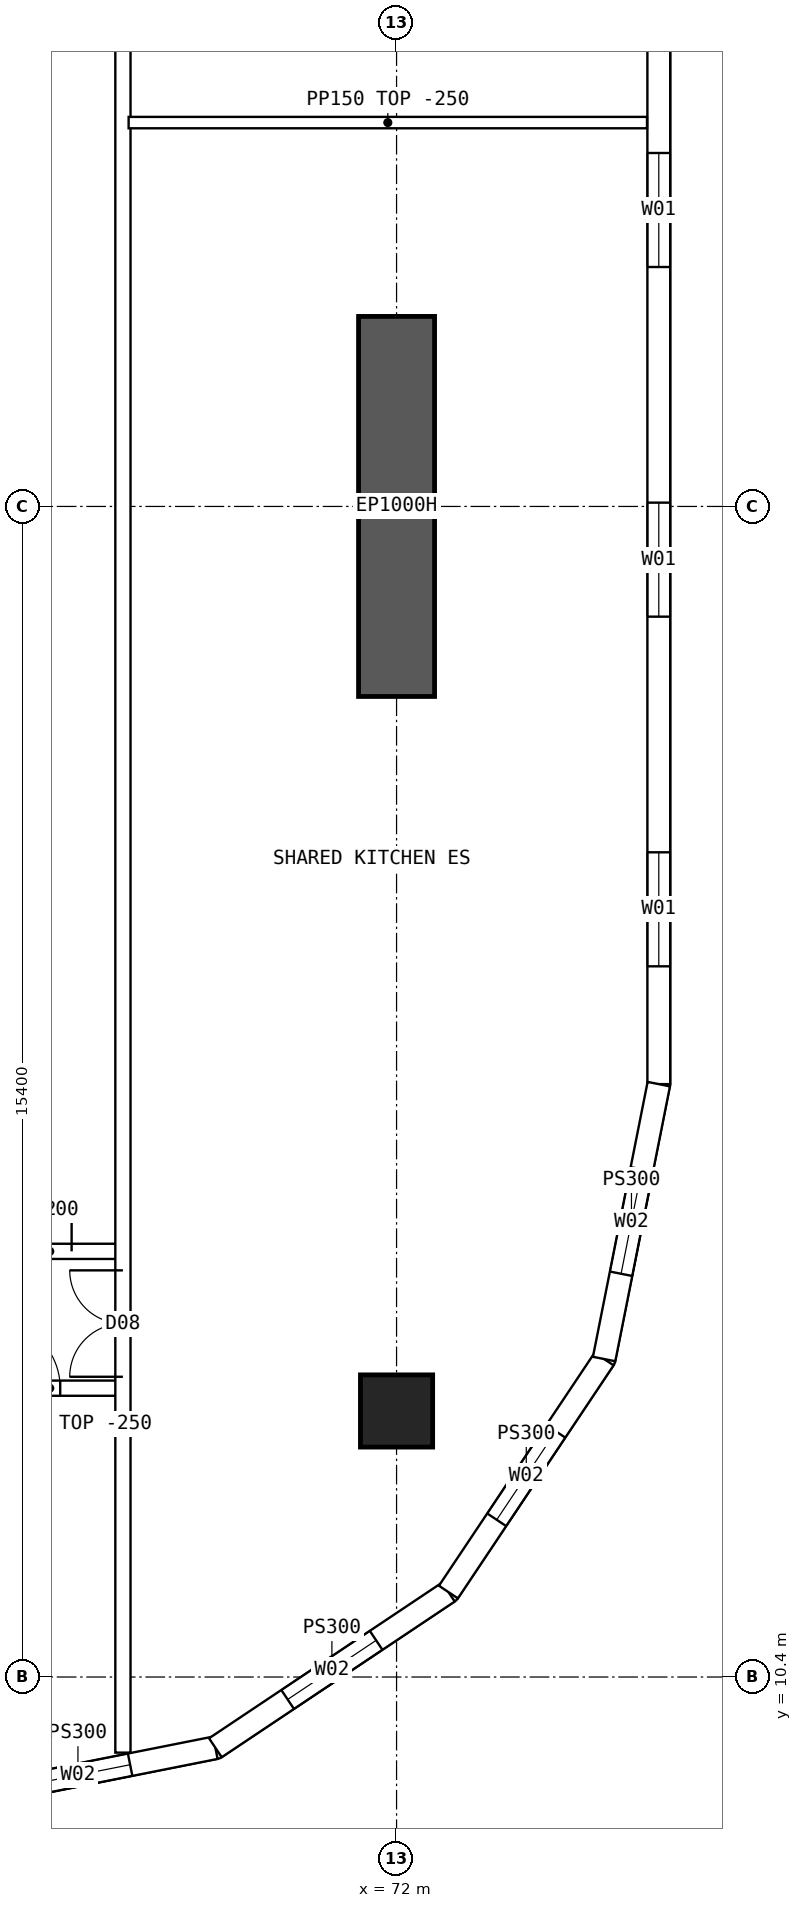
"""IFC4 building model, lengths in metres.
Left out: names, types, materials, properties, quantities, classifications, styles, units other than length and angle.
Written with IfcOpenShell. Run it as: python <this file> out.ifc"""

import sys

from ifc_helpers import new_model, si_unit, direction, frame, frame_2d, origin, origin_2d, place, context, subcontext, project, spatial, polyline, rectangle, hollow_rectangle, outline, extrude, element, fill, save


model = new_model("IFC4")
c1 = context("Model", 3, precision=1e-05, world=origin(), true_north=direction((0.0, 1.0)))
c2 = subcontext(c1, "Body", "Model", "MODEL_VIEW")
j1 = project(units=[si_unit("LENGTHUNIT", "METRE"), si_unit("PLANEANGLEUNIT", "RADIAN")], contexts=[c1])
p1 = place(None, origin())
s1 = spatial("IfcSite", under=j1, at=p1, CompositionType="ELEMENT")
p2 = place(p1, origin())
s2 = spatial("IfcBuilding", under=s1, at=p2, CompositionType="ELEMENT")
p3 = place(p2, frame((0.0, 0.0, 125.65)))
s3 = spatial("IfcBuildingStorey", under=s2, at=p3, CompositionType="ELEMENT", Elevation=125.65)
p4 = place(p3, frame((72.0, 13.9, 0.0), z_axis=(0.0, 0.0, 1.0), x_axis=(1.0, 0.0, 0.0)))
e1 = element("IfcColumn", 1, at=p4, inside=s3, PredefinedType="COLUMN", context=c2, shape_type="SweptSolid", body=[
    extrude(hollow_rectangle(XDim=0.95, YDim=0.95, WallThickness=0.095, at=origin_2d()), origin(), (0.0, 0.0, 1.0), 3.75),
])
p5 = place(p3, frame((72.0, 23.3, 0.0), z_axis=(0.0, 0.0, 1.0), x_axis=(0.0, 1.0, 0.0)))
e2 = element("IfcWall", 2, at=p5, inside=s3, PredefinedType="SHEAR", context=c2, shape_type="SweptSolid", body=[
    extrude(rectangle(XDim=5.0, YDim=1.0, at=frame_2d((2.5, 0.0))), origin(), (0.0, 0.0, 1.0), 3.75),
])
p6 = place(p3, frame((75.45, 18.2, 0.0), z_axis=(0.0, 0.0, 1.0), x_axis=(0.0, 1.0, 0.0)))
e3 = element("IfcWall", 3, at=p6, inside=s3, PredefinedType="SOLIDWALL", context=c2, shape_type="SweptSolid", body=[
    extrude(outline(polyline([(-0.015, -0.15), (27.615, -0.15), (27.585, 0.15), (0.015, 0.15), (-0.015, -0.15)])), origin(), (0.0, 0.0, 1.0), 3.5),
])
p7 = place(p6, frame((1.55, 0.0, 0.9)))
e4 = element("IfcOpeningElement", 4, at=p7, cuts=e3, PredefinedType="OPENING", context=c2, shape_type="SweptSolid", body=[
    extrude(rectangle(XDim=1.5, YDim=2.0, at=frame_2d((0.75, 1.0))), frame((0.0, 0.16, 0.0), z_axis=(0.0, -1.0, 0.0), x_axis=(1.0, 0.0, 0.0)), (0.0, 0.0, 1.0), 0.32),
])
p8 = place(p6, frame((6.15, 0.0, 0.9)))
e5 = element("IfcOpeningElement", 5, at=p8, cuts=e3, PredefinedType="OPENING", context=c2, shape_type="SweptSolid", body=[
    extrude(rectangle(XDim=1.5, YDim=2.0, at=frame_2d((0.75, 1.0))), frame((0.0, 0.16, 0.0), z_axis=(0.0, -1.0, 0.0), x_axis=(1.0, 0.0, 0.0)), (0.0, 0.0, 1.0), 0.32),
])
p9 = place(p6, frame((10.75, 0.0, 0.9)))
e6 = element("IfcOpeningElement", 6, at=p9, cuts=e3, PredefinedType="OPENING", context=c2, shape_type="SweptSolid", body=[
    extrude(rectangle(XDim=1.5, YDim=2.0, at=frame_2d((0.75, 1.0))), frame((0.0, 0.16, 0.0), z_axis=(0.0, -1.0, 0.0), x_axis=(1.0, 0.0, 0.0)), (0.0, 0.0, 1.0), 0.32),
])
p10 = place(p6, frame((15.35, 0.0, 0.9)))
e7 = element("IfcOpeningElement", 7, at=p10, cuts=e3, PredefinedType="OPENING", context=c2, shape_type="SweptSolid", body=[
    extrude(rectangle(XDim=1.5, YDim=2.0, at=frame_2d((0.75, 1.0))), frame((0.0, 0.16, 0.0), z_axis=(0.0, -1.0, 0.0), x_axis=(1.0, 0.0, 0.0)), (0.0, 0.0, 1.0), 0.32),
])
p11 = place(p6, frame((19.95, 0.0, 0.9)))
e8 = element("IfcOpeningElement", 8, at=p11, cuts=e3, PredefinedType="OPENING", context=c2, shape_type="SweptSolid", body=[
    extrude(rectangle(XDim=1.5, YDim=2.0, at=frame_2d((0.75, 1.0))), frame((0.0, 0.16, 0.0), z_axis=(0.0, -1.0, 0.0), x_axis=(1.0, 0.0, 0.0)), (0.0, 0.0, 1.0), 0.32),
])
p12 = place(p6, frame((24.55, 0.0, 0.9)))
e9 = element("IfcOpeningElement", 9, at=p12, cuts=e3, PredefinedType="OPENING", context=c2, shape_type="SweptSolid", body=[
    extrude(rectangle(XDim=1.5, YDim=2.0, at=frame_2d((0.75, 1.0))), frame((0.0, 0.16, 0.0), z_axis=(0.0, -1.0, 0.0), x_axis=(1.0, 0.0, 0.0)), (0.0, 0.0, 1.0), 0.32),
])
p13 = place(p3, frame((66.0, 8.75, 0.0), z_axis=(0.0, 0.0, 1.0), x_axis=(0.980791473772, 0.195059183267, 0.0)))
e10 = element("IfcWall", 10, at=p13, inside=s3, PredefinedType="SOLIDWALL", context=c2, shape_type="SweptSolid", body=[
    extrude(outline(polyline([(-0.03, -0.15), (3.717, -0.15), (3.657, 0.15), (0.03, 0.15), (-0.03, -0.15)])), origin(), (0.0, 0.0, 1.0), 3.5),
])
p14 = place(p13, frame((1.144, 0.0, 0.9)))
e11 = element("IfcOpeningElement", 11, at=p14, cuts=e10, PredefinedType="OPENING", context=c2, shape_type="SweptSolid", body=[
    extrude(rectangle(XDim=1.4, YDim=1.8, at=frame_2d((0.7, 0.9))), frame((0.0, 0.16, 0.0), z_axis=(0.0, -1.0, 0.0), x_axis=(1.0, 0.0, 0.0)), (0.0, 0.0, 1.0), 0.32),
])
p15 = place(p3, frame((69.616, 9.469, 0.0), z_axis=(0.0, 0.0, 1.0), x_axis=(0.831448786846, 0.555601399253, 0.0)))
e12 = element("IfcWall", 12, at=p15, inside=s3, PredefinedType="SOLIDWALL", context=c2, shape_type="SweptSolid", body=[
    extrude(outline(polyline([(-0.03, -0.15), (3.717, -0.15), (3.657, 0.15), (0.03, 0.15), (-0.03, -0.15)])), origin(), (0.0, 0.0, 1.0), 3.5),
])
p16 = place(p15, frame((1.144, 0.0, 0.9)))
e13 = element("IfcOpeningElement", 13, at=p16, cuts=e12, PredefinedType="OPENING", context=c2, shape_type="SweptSolid", body=[
    extrude(rectangle(XDim=1.4, YDim=1.8, at=frame_2d((0.7, 0.9))), frame((0.0, 0.16, 0.0), z_axis=(0.0, -1.0, 0.0), x_axis=(1.0, 0.0, 0.0)), (0.0, 0.0, 1.0), 0.32),
])
p17 = place(p3, frame((72.682, 11.518, 0.0), z_axis=(0.0, 0.0, 1.0), x_axis=(0.555601399253, 0.831448786846, 0.0)))
e14 = element("IfcWall", 14, at=p17, inside=s3, PredefinedType="SOLIDWALL", context=c2, shape_type="SweptSolid", body=[
    extrude(outline(polyline([(-0.03, -0.15), (3.717, -0.15), (3.657, 0.15), (0.03, 0.15), (-0.03, -0.15)])), origin(), (0.0, 0.0, 1.0), 3.5),
])
p18 = place(p17, frame((1.144, 0.0, 0.9)))
e15 = element("IfcOpeningElement", 15, at=p18, cuts=e14, PredefinedType="OPENING", context=c2, shape_type="SweptSolid", body=[
    extrude(rectangle(XDim=1.4, YDim=1.8, at=frame_2d((0.7, 0.9))), frame((0.0, 0.16, 0.0), z_axis=(0.0, -1.0, 0.0), x_axis=(1.0, 0.0, 0.0)), (0.0, 0.0, 1.0), 0.32),
])
p19 = place(p3, frame((74.731, 14.583, 0.0), z_axis=(0.0, 0.0, 1.0), x_axis=(0.195059183267, 0.980791473772, 0.0)))
e16 = element("IfcWall", 16, at=p19, inside=s3, PredefinedType="SOLIDWALL", context=c2, shape_type="SweptSolid", body=[
    extrude(outline(polyline([(-0.03, -0.15), (3.702, -0.15), (3.672, 0.15), (0.03, 0.15), (-0.03, -0.15)])), origin(), (0.0, 0.0, 1.0), 3.5),
])
p20 = place(p19, frame((1.144, 0.0, 0.9)))
e17 = element("IfcOpeningElement", 17, at=p20, cuts=e16, PredefinedType="OPENING", context=c2, shape_type="SweptSolid", body=[
    extrude(rectangle(XDim=1.4, YDim=1.8, at=frame_2d((0.7, 0.9))), frame((0.0, 0.16, 0.0), z_axis=(0.0, -1.0, 0.0), x_axis=(1.0, 0.0, 0.0)), (0.0, 0.0, 1.0), 0.32),
])
p21 = place(p3, frame((66.475, 14.2, 0.0), z_axis=(0.0, 0.0, 1.0), x_axis=(1.0, 0.0, 0.0)))
e18 = element("IfcWall", 18, at=p21, inside=s3, PredefinedType="SOLIDWALL", context=c2, shape_type="SweptSolid", body=[
    extrude(rectangle(XDim=1.925, YDim=0.2, at=frame_2d((0.962, 0.0))), origin(), (0.0, 0.0, 1.0), 3.5),
])
p22 = place(p21, frame((0.2, 0.0, 0.0)))
e19 = element("IfcOpeningElement", 19, at=p22, cuts=e18, PredefinedType="OPENING", context=c2, shape_type="SweptSolid", body=[
    extrude(rectangle(XDim=0.9, YDim=2.1, at=frame_2d((0.45, 1.05))), frame((0.0, 0.11, 0.0), z_axis=(0.0, -1.0, 0.0), x_axis=(1.0, 0.0, 0.0)), (0.0, 0.0, 1.0), 0.22),
])
p23 = place(p3, frame((66.475, 16.0, 0.0), z_axis=(0.0, 0.0, 1.0), x_axis=(1.0, 0.0, 0.0)))
e20 = element("IfcWall", 20, at=p23, inside=s3, PredefinedType="SOLIDWALL", context=c2, shape_type="SweptSolid", body=[
    extrude(rectangle(XDim=1.925, YDim=0.2, at=frame_2d((0.962, 0.0))), origin(), (0.0, 0.0, 1.0), 3.5),
])
p24 = place(p23, frame((0.05, 0.0, 0.0)))
e21 = element("IfcOpeningElement", 21, at=p24, cuts=e20, PredefinedType="OPENING", context=c2, shape_type="SweptSolid", body=[
    extrude(rectangle(XDim=1.2, YDim=2.1, at=frame_2d((0.6, 1.05))), frame((0.0, 0.11, 0.0), z_axis=(0.0, -1.0, 0.0), x_axis=(1.0, 0.0, 0.0)), (0.0, 0.0, 1.0), 0.22),
])
p25 = place(p3, frame((68.475, 30.85, 0.0), z_axis=(0.0, 0.0, 1.0), x_axis=(1.0, 0.0, 0.0)))
e22 = element("IfcWall", 22, at=p25, inside=s3, PredefinedType="PARTITIONING", context=c2, shape_type="SweptSolid", body=[
    extrude(outline(polyline([(0.0, 0.0), (6.82, 0.0), (6.82, 3.5), (3.827, 3.5), (3.825, 3.05), (3.227, 3.05), (3.225, 3.5), (0.0, 3.5), (0.0, 0.0)])), frame((0.0, 0.075, 0.0), z_axis=(0.0, -1.0, 0.0), x_axis=(1.0, 0.0, 0.0)), (0.0, 0.0, 1.0), 0.15),
])
p26 = place(p3, frame((68.4, 9.405, 0.0), z_axis=(0.0, 0.0, 1.0), x_axis=(0.0, 1.0, 0.0)))
e23 = element("IfcWall", 23, at=p26, inside=s3, PredefinedType="SOLIDWALL", context=c2, shape_type="SweptSolid", body=[
    extrude(rectangle(XDim=45.189, YDim=0.2, at=frame_2d((22.595, 0.0))), origin(), (0.0, 0.0, 1.0), 3.5),
])
p27 = place(p26, frame((4.945, 0.0, 0.0)))
e24 = element("IfcOpeningElement", 24, at=p27, cuts=e23, PredefinedType="OPENING", context=c2, shape_type="SweptSolid", body=[
    extrude(rectangle(XDim=1.4, YDim=2.1, at=frame_2d((0.7, 1.05))), frame((0.0, 0.11, 0.0), z_axis=(0.0, -1.0, 0.0), x_axis=(1.0, 0.0, 0.0)), (0.0, 0.0, 1.0), 0.22),
])
p28 = place(p26, frame((38.745, 0.0, 0.0)))
e25 = element("IfcOpeningElement", 25, at=p28, cuts=e23, PredefinedType="OPENING", context=c2, shape_type="SweptSolid", body=[
    extrude(rectangle(XDim=1.4, YDim=2.1, at=frame_2d((0.7, 1.05))), frame((0.0, 0.11, 0.0), z_axis=(0.0, -1.0, 0.0), x_axis=(1.0, 0.0, 0.0)), (0.0, 0.0, 1.0), 0.22),
])
p29 = place(p7, origin())
e26 = element("IfcWindow", 26, at=p29, inside=s3, PartitioningType="SINGLE_PANEL", PredefinedType="WINDOW", context=c2, shape_type="SweptSolid", body=[
    extrude(rectangle(XDim=1.5, YDim=2.0, at=frame_2d((0.75, 1.0))), frame((0.0, 0.03, 0.0), z_axis=(0.0, -1.0, 0.0), x_axis=(1.0, 0.0, 0.0)), (0.0, 0.0, 1.0), 0.06),
])
fill(e4, e26)
p30 = place(p8, origin())
e27 = element("IfcWindow", 27, at=p30, inside=s3, PartitioningType="SINGLE_PANEL", PredefinedType="WINDOW", context=c2, shape_type="SweptSolid", body=[
    extrude(rectangle(XDim=1.5, YDim=2.0, at=frame_2d((0.75, 1.0))), frame((0.0, 0.03, 0.0), z_axis=(0.0, -1.0, 0.0), x_axis=(1.0, 0.0, 0.0)), (0.0, 0.0, 1.0), 0.06),
])
fill(e5, e27)
p31 = place(p9, origin())
e28 = element("IfcWindow", 28, at=p31, inside=s3, PartitioningType="SINGLE_PANEL", PredefinedType="WINDOW", context=c2, shape_type="SweptSolid", body=[
    extrude(rectangle(XDim=1.5, YDim=2.0, at=frame_2d((0.75, 1.0))), frame((0.0, 0.03, 0.0), z_axis=(0.0, -1.0, 0.0), x_axis=(1.0, 0.0, 0.0)), (0.0, 0.0, 1.0), 0.06),
])
fill(e6, e28)
p32 = place(p14, origin())
e29 = element("IfcWindow", 29, at=p32, inside=s3, PartitioningType="SINGLE_PANEL", PredefinedType="WINDOW", context=c2, shape_type="SweptSolid", body=[
    extrude(rectangle(XDim=1.4, YDim=1.8, at=frame_2d((0.7, 0.9))), frame((0.0, 0.03, 0.0), z_axis=(0.0, -1.0, 0.0), x_axis=(1.0, 0.0, 0.0)), (0.0, 0.0, 1.0), 0.06),
])
fill(e11, e29)
p33 = place(p16, origin())
e30 = element("IfcWindow", 30, at=p33, inside=s3, PartitioningType="SINGLE_PANEL", PredefinedType="WINDOW", context=c2, shape_type="SweptSolid", body=[
    extrude(rectangle(XDim=1.4, YDim=1.8, at=frame_2d((0.7, 0.9))), frame((0.0, 0.03, 0.0), z_axis=(0.0, -1.0, 0.0), x_axis=(1.0, 0.0, 0.0)), (0.0, 0.0, 1.0), 0.06),
])
fill(e13, e30)
p34 = place(p18, origin())
e31 = element("IfcWindow", 31, at=p34, inside=s3, PartitioningType="SINGLE_PANEL", PredefinedType="WINDOW", context=c2, shape_type="SweptSolid", body=[
    extrude(rectangle(XDim=1.4, YDim=1.8, at=frame_2d((0.7, 0.9))), frame((0.0, 0.03, 0.0), z_axis=(0.0, -1.0, 0.0), x_axis=(1.0, 0.0, 0.0)), (0.0, 0.0, 1.0), 0.06),
])
fill(e15, e31)
p35 = place(p20, origin())
e32 = element("IfcWindow", 32, at=p35, inside=s3, PartitioningType="SINGLE_PANEL", PredefinedType="WINDOW", context=c2, shape_type="SweptSolid", body=[
    extrude(rectangle(XDim=1.4, YDim=1.8, at=frame_2d((0.7, 0.9))), frame((0.0, 0.03, 0.0), z_axis=(0.0, -1.0, 0.0), x_axis=(1.0, 0.0, 0.0)), (0.0, 0.0, 1.0), 0.06),
])
fill(e17, e32)
p36 = place(p24, origin())
e33 = element("IfcDoor", 33, at=p36, inside=s3, OperationType="DOUBLE_DOOR_SINGLE_SWING", PredefinedType="DOOR", context=c2, shape_type="SweptSolid", body=[
    extrude(rectangle(XDim=1.2, YDim=2.1, at=frame_2d((0.6, 1.05))), frame((0.0, 0.025, 0.0), z_axis=(0.0, -1.0, 0.0), x_axis=(1.0, 0.0, 0.0)), (0.0, 0.0, 1.0), 0.05),
])
fill(e21, e33)
p37 = place(p27, origin())
e34 = element("IfcDoor", 34, at=p37, inside=s3, OperationType="DOUBLE_DOOR_SINGLE_SWING", PredefinedType="DOOR", context=c2, shape_type="SweptSolid", body=[
    extrude(rectangle(XDim=1.4, YDim=2.1, at=frame_2d((0.7, 1.05))), frame((0.0, 0.025, 0.0), z_axis=(0.0, -1.0, 0.0), x_axis=(1.0, 0.0, 0.0)), (0.0, 0.0, 1.0), 0.05),
])
fill(e24, e34)
p38 = place(p22, origin())
e35 = element("IfcDoor", 35, at=p38, inside=s3, OperationType="SINGLE_SWING_LEFT", PredefinedType="DOOR", context=c2, shape_type="SweptSolid", body=[
    extrude(rectangle(XDim=0.9, YDim=2.1, at=frame_2d((0.45, 1.05))), frame((0.0, 0.025, 0.0), z_axis=(0.0, -1.0, 0.0), x_axis=(1.0, 0.0, 0.0)), (0.0, 0.0, 1.0), 0.05),
])
fill(e19, e35)
save(model, sys.argv[1])
